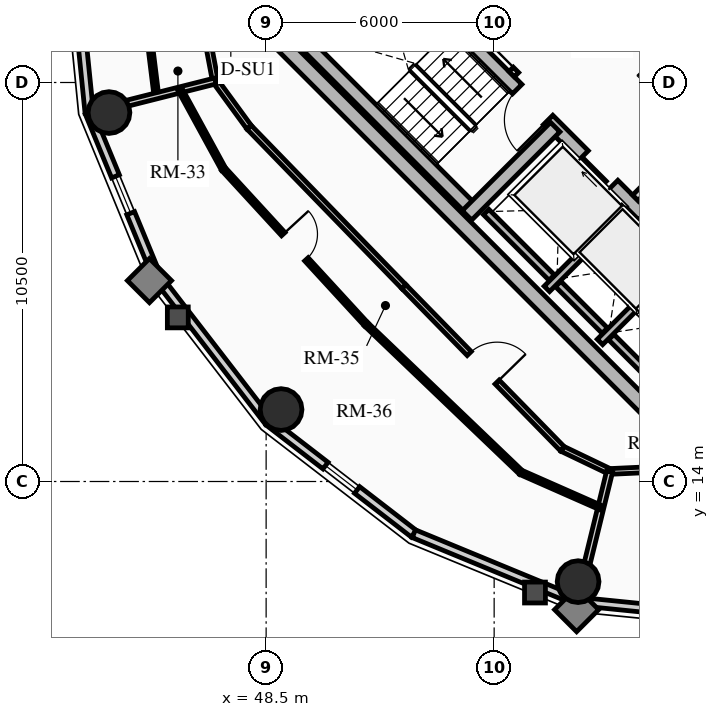
"""IFC4 building model, lengths in metres.
Left out: names, types, materials, properties, quantities, classifications, styles, units other than length and angle.
Written with IfcOpenShell. Run it as: python <this file> out.ifc"""

import sys

from ifc_helpers import new_model, si_unit, direction, frame, frame_2d, origin, origin_2d, place, context, subcontext, project, spatial, rectangle, circle, extrude, source, transform, mapped, element, fill, save


model = new_model("IFC4")
c1 = context("Model", 3, precision=1e-05, world=origin(), true_north=direction((0.0, 1.0)))
c2 = subcontext(c1, "Body", "Model", "MODEL_VIEW")
j1 = project(units=[si_unit("LENGTHUNIT", "METRE"), si_unit("PLANEANGLEUNIT", "RADIAN")], contexts=[c1])
p1 = place(None, origin())
s1 = spatial("IfcSite", under=j1, at=p1, CompositionType="ELEMENT")
p2 = place(p1, origin())
s2 = spatial("IfcBuilding", under=s1, at=p2, CompositionType="ELEMENT")
p3 = place(p2, frame((0.0, 0.0, 219.94)))
s3 = spatial("IfcBuildingStorey", under=s2, at=p3, CompositionType="ELEMENT", Elevation=219.94)
for number, where, z_axis, x_axis in (
    (1, (58.702, 15.732, 0.0), (0.0, 0.0, 1.0), (-0.707, 0.707, 0.0)),
    (2, (66.268, 23.298, 0.0), (0.0, 0.0, 1.0), (-0.707, 0.707, 0.0)),
):
    element("IfcWall", number, at=place(p3, frame(where, z_axis=z_axis, x_axis=x_axis)), inside=s3, PredefinedType="SHEAR", context=c2, shape_type="SweptSolid", body=[
        extrude(rectangle(XDim=14.1, YDim=0.4, at=frame_2d((7.05, 0.0))), origin(), (0.0, 0.0, 1.0), 2.91),
    ])
p4 = place(p3, frame((61.06, 18.373, 0.0), z_axis=(0.0, 0.0, 1.0), x_axis=(-0.707106781187, 0.707106781187, 0.0)))
e3 = element("IfcWall", 3, at=p4, inside=s3, PredefinedType="SHEAR", context=c2, shape_type="SweptSolid", body=[
    extrude(rectangle(XDim=13.7, YDim=0.35, at=frame_2d((6.85, 0.0))), origin(), (0.0, 0.0, 1.0), 2.91),
])
m1 = source(origin(), c2, "Body", "SweptSolid", [
    extrude(rectangle(XDim=1.1, YDim=2.015, at=frame_2d((0.55, 1.007))), frame((0.0, 0.185, 0.0), z_axis=(0.0, -1.0, 0.0), x_axis=(1.0, 0.0, 0.0)), (0.0, 0.0, 1.0), 0.37),
])
p5 = place(p4, frame((4.85, 0.0, 0.0)))
e4 = element("IfcOpeningElement", 4, at=p5, cuts=e3, PredefinedType="OPENING", context=c2, shape_type="MappedRepresentation", body=[
    mapped(m1, transform((0.0, 0.0, 0.0), x_axis=(1.0, 0.0, 0.0), y_axis=(0.0, 1.0, 0.0), z_axis=(0.0, 0.0, 1.0), scale=1.0)),
])
p6 = place(p4, frame((0.625, 0.0, 0.0)))
e5 = element("IfcOpeningElement", 5, at=p6, cuts=e3, PredefinedType="OPENING", context=c2, shape_type="MappedRepresentation", body=[
    mapped(m1, transform((0.0, 0.0, 0.0), x_axis=(1.0, 0.0, 0.0), y_axis=(0.0, 1.0, 0.0), z_axis=(0.0, 0.0, 1.0), scale=1.0)),
])
p7 = place(p4, frame((2.625, 0.0, 0.0)))
e6 = element("IfcOpeningElement", 6, at=p7, cuts=e3, PredefinedType="OPENING", context=c2, shape_type="MappedRepresentation", body=[
    mapped(m1, transform((0.0, 0.0, 0.0), x_axis=(1.0, 0.0, 0.0), y_axis=(0.0, 1.0, 0.0), z_axis=(0.0, 0.0, 1.0), scale=1.0)),
])
m2 = source(origin(), c2, "Body", "SweptSolid", [
    extrude(rectangle(XDim=1.15, YDim=2.02, at=frame_2d((0.575, 1.01))), frame((0.0, 0.185, 0.0), z_axis=(0.0, -1.0, 0.0), x_axis=(1.0, 0.0, 0.0)), (0.0, 0.0, 1.0), 0.37),
])
p8 = place(p4, frame((7.27, 0.0, 0.0)))
e7 = element("IfcOpeningElement", 7, at=p8, cuts=e3, PredefinedType="OPENING", context=c2, shape_type="MappedRepresentation", body=[
    mapped(m2, transform((0.0, 0.0, 0.0), x_axis=(1.0, 0.0, 0.0), y_axis=(0.0, 1.0, 0.0), z_axis=(0.0, 0.0, 1.0), scale=1.0)),
])
p9 = place(p3, frame((63.627, 20.94, 0.0), z_axis=(0.0, 0.0, 1.0), x_axis=(-0.707119496762, 0.707094065383, 0.0)))
e8 = element("IfcWall", 8, at=p9, inside=s3, PredefinedType="SHEAR", context=c2, shape_type="SweptSolid", body=[
    extrude(rectangle(XDim=9.6, YDim=0.35, at=frame_2d((4.8, 0.0))), origin(), (0.0, 0.0, 1.0), 2.91),
])
p10 = place(p9, frame((5.28, 0.0, 0.0)))
e9 = element("IfcOpeningElement", 9, at=p10, cuts=e8, PredefinedType="OPENING", context=c2, shape_type="MappedRepresentation", body=[
    mapped(m2, transform((0.0, 0.0, 0.0), x_axis=(1.0, 0.0, 0.0), y_axis=(0.0, 1.0, 0.0), z_axis=(0.0, 0.0, 1.0), scale=1.0)),
])
p11 = place(p3, frame((53.922, 21.141, 0.0), z_axis=(0.0, 0.0, 1.0), x_axis=(-0.707106781187, 0.707106781187, 0.0)))
e10 = element("IfcWall", 10, at=p11, inside=s3, PredefinedType="SHEAR", context=c2, shape_type="SweptSolid", body=[
    extrude(rectangle(XDim=6.695, YDim=0.35, at=frame_2d((3.348, 0.0))), origin(), (0.0, 0.0, 1.0), 2.91),
])
p12 = place(p3, frame((53.784, 21.003, 0.0), z_axis=(0.0, 0.0, 1.0), x_axis=(0.707106781187, 0.707106781187, 0.0)))
e11 = element("IfcWall", 11, at=p12, inside=s3, PredefinedType="SHEAR", context=c2, shape_type="SweptSolid", body=[
    extrude(rectangle(XDim=3.285, YDim=0.35, at=frame_2d((1.643, 0.0))), origin(), (0.0, 0.0, 1.0), 2.91),
])
for number, where, z_axis, x_axis in (
    (12, (44.365, 23.709, 0.0), (0.0, 0.0, 1.0), (1.0, 0.0, 0.0)),
    (13, (48.893, 15.893, 0.0), (0.0, 0.0, 1.0), (1.0, 0.0, 0.0)),
    (14, (56.709, 11.365, 0.0), (0.0, 0.0, 1.0), (1.0, 0.0, 0.0)),
):
    element("IfcColumn", number, at=place(p3, frame(where, z_axis=z_axis, x_axis=x_axis)), inside=s3, PredefinedType="USERDEFINED", context=c2, shape_type="SweptSolid", body=[
        extrude(circle(Radius=0.55, at=origin_2d()), origin(), (0.0, 0.0, 1.0), 2.91),
    ])
p13 = place(p3, frame((43.845, 23.705, 0.0), z_axis=(0.0, 0.0, 1.0), x_axis=(-0.100570534541, 0.994929930991, 0.0)))
e15 = element("IfcWall", 15, at=p13, inside=s3, PredefinedType="SOLIDWALL", context=c2, shape_type="SweptSolid", body=[
    extrude(rectangle(XDim=4.418, YDim=0.22, at=frame_2d((2.209, 0.0))), origin(), (0.0, 0.0, 1.0), 2.322),
])
m3 = source(origin(), c2, "Body", "SweptSolid", [
    extrude(rectangle(XDim=1.05, YDim=1.3, at=frame_2d((0.525, 0.65))), frame((0.0, 0.12, 0.0), z_axis=(0.0, -1.0, 0.0), x_axis=(1.0, 0.0, 0.0)), (0.0, 0.0, 1.0), 0.24),
])
p14 = place(p13, frame((1.684, 0.0, 0.65)))
e16 = element("IfcOpeningElement", 16, at=p14, cuts=e15, PredefinedType="OPENING", context=c2, shape_type="MappedRepresentation", body=[
    mapped(m3, transform((0.0, 0.0, 0.0), x_axis=(1.0, 0.0, 0.0), y_axis=(0.0, 1.0, 0.0), z_axis=(0.0, 0.0, 1.0), scale=1.0)),
])
p15 = place(p3, frame((45.626, 19.387, 0.0), z_axis=(0.0, 0.0, 1.0), x_axis=(-0.381309704956, 0.924447353237, 0.0)))
e17 = element("IfcWall", 17, at=p15, inside=s3, PredefinedType="SOLIDWALL", context=c2, shape_type="SweptSolid", body=[
    extrude(rectangle(XDim=4.671, YDim=0.22, at=frame_2d((2.335, 0.0))), origin(), (0.0, 0.0, 1.0), 2.322),
])
p16 = place(p15, frame((1.81, 0.0, 0.65)))
e18 = element("IfcOpeningElement", 18, at=p16, cuts=e17, PredefinedType="OPENING", context=c2, shape_type="MappedRepresentation", body=[
    mapped(m3, transform((0.0, 0.0, 0.0), x_axis=(1.0, 0.0, 0.0), y_axis=(0.0, 1.0, 0.0), z_axis=(0.0, 0.0, 1.0), scale=1.0)),
])
p17 = place(p3, frame((48.569, 15.569, 0.0), z_axis=(0.0, 0.0, 1.0), x_axis=(-0.610523083886, 0.791998462147, 0.0)))
e19 = element("IfcWall", 19, at=p17, inside=s3, PredefinedType="SOLIDWALL", context=c2, shape_type="SweptSolid", body=[
    extrude(rectangle(XDim=4.82, YDim=0.22, at=frame_2d((2.41, 0.0))), origin(), (0.0, 0.0, 1.0), 2.322),
])
p18 = place(p3, frame((52.387, 12.626, 0.0), z_axis=(0.0, 0.0, 1.0), x_axis=(-0.791998462147, 0.610523083886, 0.0)))
e20 = element("IfcWall", 20, at=p18, inside=s3, PredefinedType="SOLIDWALL", context=c2, shape_type="SweptSolid", body=[
    extrude(rectangle(XDim=4.82, YDim=0.22, at=frame_2d((2.41, 0.0))), origin(), (0.0, 0.0, 1.0), 2.322),
])
p19 = place(p18, frame((1.885, 0.0, 0.65)))
e21 = element("IfcOpeningElement", 21, at=p19, cuts=e20, PredefinedType="OPENING", context=c2, shape_type="MappedRepresentation", body=[
    mapped(m3, transform((0.0, 0.0, 0.0), x_axis=(1.0, 0.0, 0.0), y_axis=(0.0, 1.0, 0.0), z_axis=(0.0, 0.0, 1.0), scale=1.0)),
])
p20 = place(p3, frame((56.705, 10.845, 0.0), z_axis=(0.0, 0.0, 1.0), x_axis=(-0.924447353237, 0.381309704956, 0.0)))
e22 = element("IfcWall", 22, at=p20, inside=s3, PredefinedType="SOLIDWALL", context=c2, shape_type="SweptSolid", body=[
    extrude(rectangle(XDim=4.671, YDim=0.22, at=frame_2d((2.335, 0.0))), origin(), (0.0, 0.0, 1.0), 2.322),
])
p21 = place(p3, frame((61.1, 10.401, 0.0), z_axis=(0.0, 0.0, 1.0), x_axis=(-0.994929930991, 0.100570534541, 0.0)))
e23 = element("IfcWall", 23, at=p21, inside=s3, PredefinedType="SOLIDWALL", context=c2, shape_type="SweptSolid", body=[
    extrude(rectangle(XDim=4.418, YDim=0.22, at=frame_2d((2.209, 0.0))), origin(), (0.0, 0.0, 1.0), 2.322),
])
p22 = place(p21, frame((1.684, 0.0, 0.65)))
e24 = element("IfcOpeningElement", 24, at=p22, cuts=e23, PredefinedType="OPENING", context=c2, shape_type="MappedRepresentation", body=[
    mapped(m3, transform((0.0, 0.0, 0.0), x_axis=(1.0, 0.0, 0.0), y_axis=(0.0, 1.0, 0.0), z_axis=(0.0, 0.0, 1.0), scale=1.0)),
])
p23 = place(p3, frame((55.888, 19.069, 0.0), z_axis=(0.0, 0.0, 1.0), x_axis=(0.707106781187, 0.707106781187, 0.0)))
e25 = element("IfcWall", 25, at=p23, inside=s3, PredefinedType="SHEAR", context=c2, shape_type="SweptSolid", body=[
    extrude(rectangle(XDim=2.97, YDim=0.2, at=frame_2d((1.485, 0.0))), origin(), (0.0, 0.0, 1.0), 2.91),
])
p24 = place(p3, frame((56.015, 19.366, 0.0), z_axis=(0.0, 0.0, 1.0), x_axis=(-0.707106781187, 0.707106781187, 0.0)))
e26 = element("IfcWall", 26, at=p24, inside=s3, PredefinedType="SHEAR", context=c2, shape_type="SweptSolid", body=[
    extrude(rectangle(XDim=2.44, YDim=0.2, at=frame_2d((1.22, 0.0))), origin(), (0.0, 0.0, 1.0), 2.91),
])
p25 = place(p3, frame((57.284, 17.673, 0.0), z_axis=(0.0, 0.0, 1.0), x_axis=(0.707147878904, 0.70706568108, 0.0)))
e27 = element("IfcWall", 27, at=p25, inside=s3, PredefinedType="SHEAR", context=c2, shape_type="SweptSolid", body=[
    extrude(rectangle(XDim=2.97, YDim=0.2, at=frame_2d((1.485, 0.0))), origin(), (0.0, 0.0, 1.0), 2.91),
])
p26 = place(p3, frame((57.412, 17.97, 0.0), z_axis=(0.0, 0.0, 1.0), x_axis=(-0.707106781187, 0.707106781187, 0.0)))
e28 = element("IfcWall", 28, at=p26, inside=s3, PredefinedType="SHEAR", context=c2, shape_type="SweptSolid", body=[
    extrude(rectangle(XDim=1.735, YDim=0.2, at=frame_2d((0.867, 0.0))), origin(), (0.0, 0.0, 1.0), 2.91),
])
p27 = place(p3, frame((58.737, 16.644, 0.0), z_axis=(0.0, 0.0, 1.0), x_axis=(-0.707032117043, 0.707181437447, 0.0)))
e29 = element("IfcWall", 29, at=p27, inside=s3, PredefinedType="SHEAR", context=c2, shape_type="SweptSolid", body=[
    extrude(rectangle(XDim=1.635, YDim=0.2, at=frame_2d((0.817, 0.0))), origin(), (0.0, 0.0, 1.0), 2.91),
])
p28 = place(p3, frame((58.214, 21.467, 0.0), z_axis=(0.0, 0.0, 1.0), x_axis=(0.707106781187, 0.707106781187, 0.0)))
e30 = element("IfcWall", 30, at=p28, inside=s3, PredefinedType="PARTITIONING", context=c2, shape_type="SweptSolid", body=[
    extrude(rectangle(XDim=3.28, YDim=0.2, at=frame_2d((1.64, 0.0))), origin(), (0.0, 0.0, 1.0), 2.685),
])
m4 = source(origin(), c2, "Body", "SweptSolid", [
    extrude(rectangle(XDim=1.5, YDim=2.02, at=frame_2d((0.75, 1.01))), frame((0.0, 0.11, 0.0), z_axis=(0.0, -1.0, 0.0), x_axis=(1.0, 0.0, 0.0)), (0.0, 0.0, 1.0), 0.22),
])
p29 = place(p28, frame((1.55, 0.0, 0.0)))
e31 = element("IfcOpeningElement", 31, at=p29, cuts=e30, PredefinedType="OPENING", context=c2, shape_type="MappedRepresentation", body=[
    mapped(m4, transform((0.0, 0.0, 0.0), x_axis=(1.0, 0.0, 0.0), y_axis=(0.0, 1.0, 0.0), z_axis=(0.0, 0.0, 1.0), scale=1.0)),
])
p30 = place(p3, frame((54.961, 24.719, 0.0), z_axis=(0.0, 0.0, 1.0), x_axis=(0.707106781187, 0.707106781187, 0.0)))
e32 = element("IfcWall", 32, at=p30, inside=s3, PredefinedType="PARTITIONING", context=c2, shape_type="SweptSolid", body=[
    extrude(rectangle(XDim=3.28, YDim=0.2, at=frame_2d((1.64, 0.0))), origin(), (0.0, 0.0, 1.0), 2.685),
])
m5 = source(origin(), c2, "Body", "SweptSolid", [
    extrude(rectangle(XDim=0.9, YDim=2.005, at=frame_2d((0.45, 1.002))), frame((0.0, 0.11, 0.0), z_axis=(0.0, -1.0, 0.0), x_axis=(1.0, 0.0, 0.0)), (0.0, 0.0, 1.0), 0.22),
])
p31 = place(p30, frame((0.16, 0.0, 0.0)))
e33 = element("IfcOpeningElement", 33, at=p31, cuts=e32, PredefinedType="OPENING", context=c2, shape_type="MappedRepresentation", body=[
    mapped(m5, transform((0.0, 0.0, 0.0), x_axis=(1.0, 0.0, 0.0), y_axis=(0.0, 1.0, 0.0), z_axis=(0.0, 0.0, 1.0), scale=1.0)),
])
p32 = place(p3, frame((46.912, 25.862, 0.0), z_axis=(0.0, 0.0, 1.0), x_axis=(0.186095172215, -0.98253172309, 0.0)))
e34 = element("IfcWall", 34, at=p32, inside=s3, PredefinedType="PARTITIONING", context=c2, shape_type="SweptSolid", body=[
    extrude(rectangle(XDim=1.346, YDim=0.15, at=frame_2d((0.673, 0.0))), origin(), (0.0, 0.0, 1.0), 2.322),
])
p33 = place(p3, frame((47.163, 24.54, 0.0), z_axis=(0.0, 0.0, 1.0), x_axis=(0.589711902124, -0.807613690135, 0.0)))
e35 = element("IfcWall", 35, at=p33, inside=s3, PredefinedType="PARTITIONING", context=c2, shape_type="SweptSolid", body=[
    extrude(rectangle(XDim=1.507, YDim=0.15, at=frame_2d((0.753, 0.0))), origin(), (0.0, 0.0, 1.0), 2.255),
])
p34 = place(p3, frame((48.052, 23.323, 0.0), z_axis=(0.0, 0.0, 1.0), x_axis=(0.696573981306, -0.717484974454, 0.0)))
e36 = element("IfcWall", 36, at=p34, inside=s3, PredefinedType="PARTITIONING", context=c2, shape_type="SweptSolid", body=[
    extrude(rectangle(XDim=5.849, YDim=0.15, at=frame_2d((2.925, 0.0))), origin(), (0.0, 0.0, 1.0), 2.685),
])
p35 = place(p3, frame((52.126, 19.126, 0.0), z_axis=(0.0, 0.0, 1.0), x_axis=(0.698979087027, -0.715142108884, 0.0)))
e37 = element("IfcWall", 37, at=p35, inside=s3, PredefinedType="PARTITIONING", context=c2, shape_type="SweptSolid", body=[
    extrude(rectangle(XDim=5.966, YDim=0.15, at=frame_2d((2.983, 0.0))), origin(), (0.0, 0.0, 1.0), 2.322),
])
m6 = source(origin(), c2, "Body", "SweptSolid", [
    extrude(rectangle(XDim=1.05, YDim=2.015, at=frame_2d((0.525, 1.007))), frame((0.0, 0.085, 0.0), z_axis=(0.0, -1.0, 0.0), x_axis=(1.0, 0.0, 0.0)), (0.0, 0.0, 1.0), 0.17),
])
p36 = place(p35, frame((2.458, 0.0, 0.0)))
e38 = element("IfcOpeningElement", 38, at=p36, cuts=e37, PredefinedType="OPENING", context=c2, shape_type="MappedRepresentation", body=[
    mapped(m6, transform((0.0, 0.0, 0.0), x_axis=(1.0, 0.0, 0.0), y_axis=(0.0, 1.0, 0.0), z_axis=(0.0, 0.0, 1.0), scale=1.0)),
])
p37 = place(p3, frame((56.296, 14.859, 0.0), z_axis=(0.0, 0.0, 1.0), x_axis=(0.90178292445, -0.432189260823, 0.0)))
e39 = element("IfcWall", 39, at=p37, inside=s3, PredefinedType="PARTITIONING", context=c2, shape_type="SweptSolid", body=[
    extrude(rectangle(XDim=1.377, YDim=0.15, at=frame_2d((0.688, 0.0))), origin(), (0.0, 0.0, 1.0), 2.255),
])
p38 = place(p3, frame((57.538, 14.264, 0.0), z_axis=(0.0, 0.0, 1.0), x_axis=(0.99892990172, 0.046249880546, 0.0)))
e40 = element("IfcWall", 40, at=p38, inside=s3, PredefinedType="PARTITIONING", context=c2, shape_type="SweptSolid", body=[
    extrude(rectangle(XDim=1.446, YDim=0.15, at=frame_2d((0.723, 0.0))), origin(), (0.0, 0.0, 1.0), 2.322),
])
p39 = place(p3, frame((47.163, 24.54, 0.0), z_axis=(0.0, 0.0, 1.0), x_axis=(-0.9696166611, -0.244629373781, 0.0)))
e41 = element("IfcWall", 41, at=p39, inside=s3, PredefinedType="PARTITIONING", context=c2, shape_type="SweptSolid", body=[
    extrude(rectangle(XDim=3.401, YDim=0.16, at=frame_2d((1.701, 0.0))), origin(), (0.0, 0.0, 1.0), 2.322),
])
p40 = place(p3, frame((57.538, 14.264, 0.0), z_axis=(0.0, 0.0, 1.0), x_axis=(-0.237377006249, -0.971417601706, 0.0)))
e42 = element("IfcWall", 42, at=p40, inside=s3, PredefinedType="PARTITIONING", context=c2, shape_type="SweptSolid", body=[
    extrude(rectangle(XDim=3.499, YDim=0.16, at=frame_2d((1.75, 0.0))), origin(), (0.0, 0.0, 1.0), 2.322),
])
p41 = place(p3, frame((45.328, 26.457, 0.0), z_axis=(0.0, 0.0, 1.0), x_axis=(0.122605181354, -0.992455525203, 0.0)))
e43 = element("IfcWall", 43, at=p41, inside=s3, PredefinedType="PARTITIONING", context=c2, shape_type="SweptSolid", body=[
    extrude(rectangle(XDim=2.228, YDim=0.125, at=frame_2d((1.114, 0.0))), origin(), (0.0, 0.0, 1.0), 2.322),
])
m7 = source(origin(), c2, "Body", "SweptSolid", [
    extrude(rectangle(XDim=0.9, YDim=2.005, at=frame_2d((0.45, 1.002))), frame((0.0, 0.073, 0.0), z_axis=(0.0, -1.0, 0.0), x_axis=(1.0, 0.0, 0.0)), (0.0, 0.0, 1.0), 0.145),
])
p42 = place(p41, frame((0.12, 0.0, 0.0)))
e44 = element("IfcOpeningElement", 44, at=p42, cuts=e43, PredefinedType="OPENING", context=c2, shape_type="MappedRepresentation", body=[
    mapped(m7, transform((0.0, 0.0, 0.0), x_axis=(1.0, 0.0, 0.0), y_axis=(0.0, 1.0, 0.0), z_axis=(0.0, 0.0, 1.0), scale=1.0)),
])
p43 = place(p3, frame((46.24, 24.307, 0.0), z_axis=(0.0, 0.0, 1.0), x_axis=(0.479212341296, -0.87769899849, 0.0)))
e45 = element("IfcWall", 45, at=p43, inside=s3, PredefinedType="PARTITIONING", context=c2, shape_type="SweptSolid", body=[
    extrude(rectangle(XDim=2.374, YDim=0.125, at=frame_2d((1.187, 0.0))), origin(), (0.0, 0.0, 1.0), 2.255),
])
p44 = place(p3, frame((47.377, 22.223, 0.0), z_axis=(0.0, 0.0, 1.0), x_axis=(0.676554417653, -0.736392639802, 0.0)))
e46 = element("IfcWall", 46, at=p44, inside=s3, PredefinedType="PARTITIONING", context=c2, shape_type="SweptSolid", body=[
    extrude(rectangle(XDim=5.553, YDim=0.125, at=frame_2d((2.776, 0.0))), origin(), (0.0, 0.0, 1.0), 2.685),
])
p45 = place(p44, frame((2.326, 0.0, 0.0)))
e47 = element("IfcOpeningElement", 47, at=p45, cuts=e46, PredefinedType="OPENING", context=c2, shape_type="MappedRepresentation", body=[
    mapped(m7, transform((0.0, 0.0, 0.0), x_axis=(1.0, 0.0, 0.0), y_axis=(0.0, 1.0, 0.0), z_axis=(0.0, 0.0, 1.0), scale=1.0)),
])
p46 = place(p3, frame((51.134, 18.134, 0.0), z_axis=(0.0, 0.0, 1.0), x_axis=(0.722450775654, -0.691422357721, 0.0)))
e48 = element("IfcWall", 48, at=p46, inside=s3, PredefinedType="PARTITIONING", context=c2, shape_type="SweptSolid", body=[
    extrude(rectangle(XDim=5.634, YDim=0.125, at=frame_2d((2.817, 0.0))), origin(), (0.0, 0.0, 1.0), 2.322),
])
p47 = place(p3, frame((55.204, 14.239, 0.0), z_axis=(0.0, 0.0, 1.0), x_axis=(0.914999746908, -0.403454412738, 0.0)))
e49 = element("IfcWall", 49, at=p47, inside=s3, PredefinedType="PARTITIONING", context=c2, shape_type="SweptSolid", body=[
    extrude(rectangle(XDim=2.297, YDim=0.125, at=frame_2d((1.148, 0.0))), origin(), (0.0, 0.0, 1.0), 2.255),
])
m8 = source(origin(), c2, "Body", "SweptSolid", [
    extrude(rectangle(XDim=1.05, YDim=1.3, at=frame_2d((0.525, 0.65))), frame((0.0, 0.03, 0.0), z_axis=(0.0, -1.0, 0.0), x_axis=(1.0, 0.0, 0.0)), (0.0, 0.0, 1.0), 0.06),
])
p48 = place(p16, origin())
e50 = element("IfcWindow", 50, at=p48, inside=s3, PartitioningType="SINGLE_PANEL", PredefinedType="WINDOW", context=c2, shape_type="MappedRepresentation", body=[
    mapped(m8, transform((0.0, 0.0, 0.0), x_axis=(1.0, 0.0, 0.0), y_axis=(0.0, 1.0, 0.0), z_axis=(0.0, 0.0, 1.0), scale=1.0)),
])
fill(e18, e50)
p49 = place(p19, origin())
e51 = element("IfcWindow", 51, at=p49, inside=s3, PartitioningType="SINGLE_PANEL", PredefinedType="WINDOW", context=c2, shape_type="MappedRepresentation", body=[
    mapped(m8, transform((0.0, 0.0, 0.0), x_axis=(1.0, 0.0, 0.0), y_axis=(0.0, 1.0, 0.0), z_axis=(0.0, 0.0, 1.0), scale=1.0)),
])
fill(e21, e51)
m9 = source(origin(), c2, "Body", "SweptSolid", [
    extrude(rectangle(XDim=1.1, YDim=2.015, at=frame_2d((0.55, 1.007))), frame((0.0, 0.025, 0.0), z_axis=(0.0, -1.0, 0.0), x_axis=(1.0, 0.0, 0.0)), (0.0, 0.0, 1.0), 0.05),
])
p50 = place(p5, origin())
e52 = element("IfcDoor", 52, at=p50, inside=s3, OperationType="SLIDING_TO_RIGHT", PredefinedType="DOOR", context=c2, shape_type="MappedRepresentation", body=[
    mapped(m9, transform((0.0, 0.0, 0.0), x_axis=(1.0, 0.0, 0.0), y_axis=(0.0, 1.0, 0.0), z_axis=(0.0, 0.0, 1.0), scale=1.0)),
])
fill(e4, e52)
m10 = source(origin(), c2, "Body", "SweptSolid", [
    extrude(rectangle(XDim=1.15, YDim=2.02, at=frame_2d((0.575, 1.01))), frame((0.0, 0.025, 0.0), z_axis=(0.0, -1.0, 0.0), x_axis=(1.0, 0.0, 0.0)), (0.0, 0.0, 1.0), 0.05),
])
p51 = place(p8, origin())
e53 = element("IfcDoor", 53, at=p51, inside=s3, OperationType="SINGLE_SWING_LEFT", PredefinedType="DOOR", context=c2, shape_type="MappedRepresentation", body=[
    mapped(m10, transform((0.0, 0.0, 0.0), x_axis=(1.0, 0.0, 0.0), y_axis=(0.0, 1.0, 0.0), z_axis=(0.0, 0.0, 1.0), scale=1.0)),
])
fill(e7, e53)
m11 = source(origin(), c2, "Body", "SweptSolid", [
    extrude(rectangle(XDim=0.9, YDim=2.005, at=frame_2d((0.45, 1.002))), frame((0.0, 0.025, 0.0), z_axis=(0.0, -1.0, 0.0), x_axis=(1.0, 0.0, 0.0)), (0.0, 0.0, 1.0), 0.05),
])
p52 = place(p31, origin())
e54 = element("IfcDoor", 54, at=p52, inside=s3, OperationType="SINGLE_SWING_LEFT", PredefinedType="DOOR", context=c2, shape_type="MappedRepresentation", body=[
    mapped(m11, transform((0.0, 0.0, 0.0), x_axis=(1.0, 0.0, 0.0), y_axis=(0.0, 1.0, 0.0), z_axis=(0.0, 0.0, 1.0), scale=1.0)),
])
fill(e33, e54)
m12 = source(origin(), c2, "Body", "SweptSolid", [
    extrude(rectangle(XDim=1.05, YDim=2.015, at=frame_2d((0.525, 1.007))), frame((0.0, 0.025, 0.0), z_axis=(0.0, -1.0, 0.0), x_axis=(1.0, 0.0, 0.0)), (0.0, 0.0, 1.0), 0.05),
])
p53 = place(p36, origin())
e55 = element("IfcDoor", 55, at=p53, inside=s3, OperationType="SINGLE_SWING_RIGHT", PredefinedType="DOOR", context=c2, shape_type="MappedRepresentation", body=[
    mapped(m12, transform((0.0, 0.0, 0.0), x_axis=(1.0, 0.0, 0.0), y_axis=(0.0, 1.0, 0.0), z_axis=(0.0, 0.0, 1.0), scale=1.0)),
])
fill(e38, e55)
p54 = place(p45, origin())
e56 = element("IfcDoor", 56, at=p54, inside=s3, OperationType="SINGLE_SWING_LEFT", PredefinedType="DOOR", context=c2, shape_type="MappedRepresentation", body=[
    mapped(m11, transform((0.0, 0.0, 0.0), x_axis=(1.0, 0.0, 0.0), y_axis=(0.0, 1.0, 0.0), z_axis=(0.0, 0.0, 1.0), scale=1.0)),
])
fill(e47, e56)
save(model, sys.argv[1])
